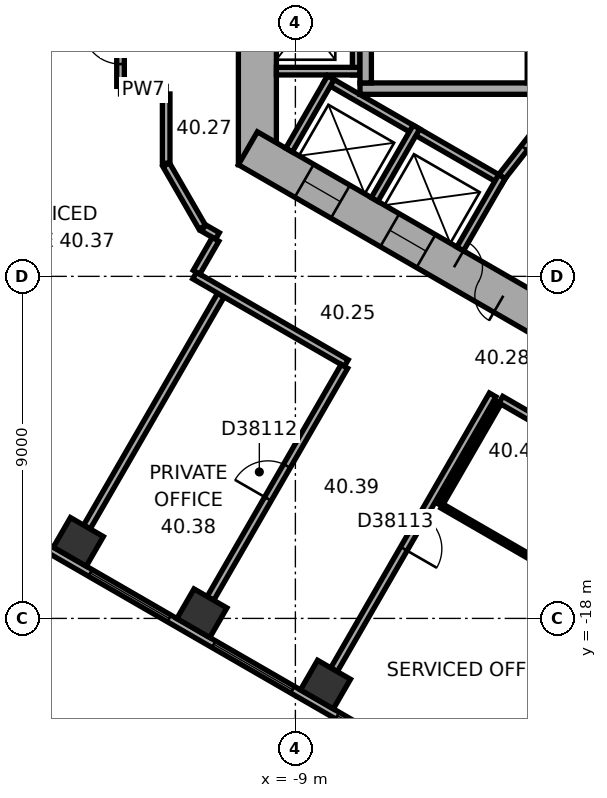
"""IFC4 building model, lengths in metres.
Left out: names, types, materials, properties, quantities, classifications, styles, units other than length and angle.
Written with IfcOpenShell. Run it as: python <this file> out.ifc"""

import sys

from ifc_helpers import new_model, si_unit, direction, frame, frame_2d, origin, origin_2d, place, context, subcontext, project, spatial, rectangle, extrude, element, fill, save


model = new_model("IFC4")
c1 = context("Model", 3, precision=1e-05, world=origin(), true_north=direction((0.0, 1.0)))
c2 = subcontext(c1, "Body", "Model", "MODEL_VIEW")
j1 = project(units=[si_unit("LENGTHUNIT", "METRE"), si_unit("PLANEANGLEUNIT", "RADIAN")], contexts=[c1])
p1 = place(None, origin())
s1 = spatial("IfcSite", under=j1, at=p1, CompositionType="ELEMENT")
p2 = place(p1, origin())
s2 = spatial("IfcBuilding", under=s1, at=p2, CompositionType="ELEMENT")
p3 = place(p2, frame((0.0, 0.0, 165.1)))
s3 = spatial("IfcBuildingStorey", under=s2, at=p3, CompositionType="ELEMENT", Elevation=165.1)
for number, where, z_axis, x_axis in (
    (1, (-14.711, -15.986, 0.0), (0.0, 0.0, 1.0), (0.866, -0.5, 0.0)),
    (2, (-11.46, -17.863, 0.0), (0.0, 0.0, 1.0), (0.866, -0.5, 0.0)),
    (3, (-8.208, -19.74, 0.0), (0.0, 0.0, 1.0), (0.866, -0.5, 0.0)),
):
    element("IfcColumn", number, at=place(p3, frame(where, z_axis=z_axis, x_axis=x_axis)), inside=s3, PredefinedType="COLUMN", context=c2, shape_type="SweptSolid", body=[
        extrude(rectangle(XDim=1.0, YDim=0.9, at=origin_2d()), origin(), (0.0, 0.0, 1.0), 3.7),
    ])
p4 = place(p3, frame((-10.0, 6.062, 0.0), z_axis=(0.0, 0.0, 1.0), x_axis=(0.0, -1.0, 0.0)))
e4 = element("IfcWall", 4, at=p4, inside=s3, PredefinedType="SHEAR", context=c2, shape_type="SweptSolid", body=[
    extrude(rectangle(XDim=12.125, YDim=1.0, at=frame_2d((6.062, 0.0))), origin(), (0.0, 0.0, 1.0), 3.7),
])
p5 = place(p4, frame((5.212, 0.0, 0.0)))
e5 = element("IfcOpeningElement", 5, at=p5, cuts=e4, PredefinedType="OPENING", context=c2, shape_type="SweptSolid", body=[
    extrude(rectangle(XDim=1.1, YDim=2.1, at=frame_2d((0.55, 1.05))), frame((0.0, 0.51, 0.0), z_axis=(0.0, -1.0, 0.0), x_axis=(1.0, 0.0, 0.0)), (0.0, 0.0, 1.0), 1.02),
])
p6 = place(p4, frame((7.812, 0.0, 0.0)))
e6 = element("IfcOpeningElement", 6, at=p6, cuts=e4, PredefinedType="OPENING", context=c2, shape_type="SweptSolid", body=[
    extrude(rectangle(XDim=1.1, YDim=2.1, at=frame_2d((0.55, 1.05))), frame((0.0, 0.51, 0.0), z_axis=(0.0, -1.0, 0.0), x_axis=(1.0, 0.0, 0.0)), (0.0, 0.0, 1.0), 1.02),
])
p7 = place(p3, frame((-10.25, -5.629, 0.0), z_axis=(0.0, 0.0, 1.0), x_axis=(0.866022616891, -0.50000482701, 0.0)))
e7 = element("IfcWall", 7, at=p7, inside=s3, PredefinedType="SHEAR", context=c2, shape_type="SweptSolid", body=[
    extrude(rectangle(XDim=12.125, YDim=1.0, at=frame_2d((6.062, 0.0))), origin(), (0.0, 0.0, 1.0), 3.7),
])
p8 = place(p7, frame((6.262, 0.0, 0.0)))
e8 = element("IfcOpeningElement", 8, at=p8, cuts=e7, PredefinedType="OPENING", context=c2, shape_type="SweptSolid", body=[
    extrude(rectangle(XDim=1.5, YDim=2.1, at=frame_2d((0.75, 1.05))), frame((0.0, 0.51, 0.0), z_axis=(0.0, -1.0, 0.0), x_axis=(1.0, 0.0, 0.0)), (0.0, 0.0, 1.0), 1.02),
])
p9 = place(p7, frame((1.712, 0.0, 0.0)))
e9 = element("IfcOpeningElement", 9, at=p9, cuts=e7, PredefinedType="OPENING", context=c2, shape_type="SweptSolid", body=[
    extrude(rectangle(XDim=1.1, YDim=2.1, at=frame_2d((0.55, 1.05))), frame((0.0, 0.51, 0.0), z_axis=(0.0, -1.0, 0.0), x_axis=(1.0, 0.0, 0.0)), (0.0, 0.0, 1.0), 1.02),
])
p10 = place(p7, frame((4.312, 0.0, 0.0)))
e10 = element("IfcOpeningElement", 10, at=p10, cuts=e7, PredefinedType="OPENING", context=c2, shape_type="SweptSolid", body=[
    extrude(rectangle(XDim=1.1, YDim=2.1, at=frame_2d((0.55, 1.05))), frame((0.0, 0.51, 0.0), z_axis=(0.0, -1.0, 0.0), x_axis=(1.0, 0.0, 0.0)), (0.0, 0.0, 1.0), 1.02),
])
p11 = place(p3, frame((-18.789, -14.267, 0.0), z_axis=(0.0, 0.0, 1.0), x_axis=(0.866023315909, -0.500003616288, 0.0)))
e11 = element("IfcWall", 11, at=p11, inside=s3, PredefinedType="STANDARD", context=c2, shape_type="SweptSolid", body=[
    extrude(rectangle(XDim=20.044, YDim=0.2, at=frame_2d((10.022, 0.0))), origin(), (0.0, 0.0, 1.0), 3.7),
])
p12 = place(p11, frame((1.314, 0.0, 0.9)))
e12 = element("IfcOpeningElement", 12, at=p12, cuts=e11, PredefinedType="OPENING", context=c2, shape_type="SweptSolid", body=[
    extrude(rectangle(XDim=2.4, YDim=2.0, at=frame_2d((1.2, 1.0))), frame((0.0, 0.11, 0.0), z_axis=(0.0, -1.0, 0.0), x_axis=(1.0, 0.0, 0.0)), (0.0, 0.0, 1.0), 0.22),
])
p13 = place(p11, frame((5.069, 0.0, 0.9)))
e13 = element("IfcOpeningElement", 13, at=p13, cuts=e11, PredefinedType="OPENING", context=c2, shape_type="SweptSolid", body=[
    extrude(rectangle(XDim=2.4, YDim=2.0, at=frame_2d((1.2, 1.0))), frame((0.0, 0.11, 0.0), z_axis=(0.0, -1.0, 0.0), x_axis=(1.0, 0.0, 0.0)), (0.0, 0.0, 1.0), 0.22),
])
p14 = place(p11, frame((8.823, 0.0, 0.9)))
e14 = element("IfcOpeningElement", 14, at=p14, cuts=e11, PredefinedType="OPENING", context=c2, shape_type="SweptSolid", body=[
    extrude(rectangle(XDim=2.4, YDim=2.0, at=frame_2d((1.2, 1.0))), frame((0.0, 0.11, 0.0), z_axis=(0.0, -1.0, 0.0), x_axis=(1.0, 0.0, 0.0)), (0.0, 0.0, 1.0), 0.22),
])
p15 = place(p11, frame((12.577, 0.0, 0.9)))
e15 = element("IfcOpeningElement", 15, at=p15, cuts=e11, PredefinedType="OPENING", context=c2, shape_type="SweptSolid", body=[
    extrude(rectangle(XDim=2.4, YDim=2.0, at=frame_2d((1.2, 1.0))), frame((0.0, 0.11, 0.0), z_axis=(0.0, -1.0, 0.0), x_axis=(1.0, 0.0, 0.0)), (0.0, 0.0, 1.0), 0.22),
])
p16 = place(p11, frame((16.331, 0.0, 0.9)))
e16 = element("IfcOpeningElement", 16, at=p16, cuts=e11, PredefinedType="OPENING", context=c2, shape_type="SweptSolid", body=[
    extrude(rectangle(XDim=2.4, YDim=2.0, at=frame_2d((1.2, 1.0))), frame((0.0, 0.11, 0.0), z_axis=(0.0, -1.0, 0.0), x_axis=(1.0, 0.0, 0.0)), (0.0, 0.0, 1.0), 0.22),
])
p17 = place(p3, frame((-7.4, 4.3, 0.0), z_axis=(0.0, 0.0, 1.0), x_axis=(0.0, -1.0, 0.0)))
e17 = element("IfcWall", 17, at=p17, inside=s3, PredefinedType="PARTITIONING", context=c2, shape_type="SweptSolid", body=[
    extrude(rectangle(XDim=8.0, YDim=0.2, at=frame_2d((4.0, 0.0))), origin(), (0.0, 0.0, 1.0), 3.42),
])
p18 = place(p3, frame((-7.3, -3.6, 0.0), z_axis=(0.0, 0.0, 1.0), x_axis=(-1.0, 0.0, 0.0)))
e18 = element("IfcWall", 18, at=p18, inside=s3, PredefinedType="PARTITIONING", context=c2, shape_type="SweptSolid", body=[
    extrude(rectangle(XDim=2.2, YDim=0.2, at=frame_2d((1.1, 0.0))), origin(), (0.0, 0.0, 1.0), 3.42),
])
p19 = place(p3, frame((-8.203, -3.809, 0.0), z_axis=(0.0, 0.0, 1.0), x_axis=(0.866028230842, -0.499995103361, 0.0)))
e19 = element("IfcWall", 19, at=p19, inside=s3, PredefinedType="PARTITIONING", context=c2, shape_type="SweptSolid", body=[
    extrude(rectangle(XDim=5.4, YDim=0.2, at=frame_2d((2.7, 0.0))), origin(), (0.0, 0.0, 1.0), 3.42),
])
for number, where, z_axis, x_axis in (
    (20, (-8.067, -3.772, 0.0), (0.0, 0.0, 1.0), (-0.5, -0.866, 0.0)),
    (21, (-5.815, -5.072, 0.0), (0.0, 0.0, 1.0), (-0.5, -0.866, 0.0)),
):
    element("IfcWall", number, at=place(p3, frame(where, z_axis=z_axis, x_axis=x_axis)), inside=s3, PredefinedType="PARTITIONING", context=c2, shape_type="SweptSolid", body=[
        extrude(rectangle(XDim=2.2, YDim=0.2, at=frame_2d((1.1, 0.0))), origin(), (0.0, 0.0, 1.0), 3.42),
    ])
p20 = place(p3, frame((-3.563, -6.372, 0.0), z_axis=(0.0, 0.0, 1.0), x_axis=(-0.499994660107, -0.866028486751, 0.0)))
e22 = element("IfcWall", 22, at=p20, inside=s3, PredefinedType="PARTITIONING", context=c2, shape_type="SweptSolid", body=[
    extrude(rectangle(XDim=2.2, YDim=0.2, at=frame_2d((1.1, 0.0))), origin(), (0.0, 0.0, 1.0), 3.42),
])
p21 = place(p3, frame((-2.6, -4.06, 0.0), z_axis=(0.0, 0.0, 1.0), x_axis=(-1.0, 0.0, 0.0)))
e23 = element("IfcWall", 23, at=p21, inside=s3, PredefinedType="SHEAR", context=c2, shape_type="SweptSolid", body=[
    extrude(rectangle(XDim=4.7, YDim=0.3, at=frame_2d((2.35, 0.0))), origin(), (0.0, 0.0, 1.0), 3.42),
])
for number, where, z_axis, x_axis in (
    (24, (-2.75, 3.15, 0.0), (0.0, 0.0, 1.0), (0.0, -1.0, 0.0)),
    (25, (-7.15, 3.15, 0.0), (0.0, 0.0, 1.0), (0.0, -1.0, 0.0)),
):
    element("IfcWall", number, at=place(p3, frame(where, z_axis=z_axis, x_axis=x_axis)), inside=s3, PredefinedType="SHEAR", context=c2, shape_type="SweptSolid", body=[
        extrude(rectangle(XDim=7.06, YDim=0.3, at=frame_2d((3.53, 0.0))), origin(), (0.0, 0.0, 1.0), 3.42),
    ])
p22 = place(p3, frame((-1.712, -4.008, 0.0), z_axis=(0.0, 0.0, 1.0), x_axis=(-0.616549420702, -0.787316208287, 0.0)))
e26 = element("IfcWall", 26, at=p22, inside=s3, PredefinedType="PARTITIONING", context=c2, shape_type="SweptSolid", body=[
    extrude(rectangle(XDim=3.002, YDim=0.2, at=frame_2d((1.501, 0.0))), origin(), (0.0, 0.0, 1.0), 3.42),
])
p23 = place(p22, frame((1.15, 0.0, 0.0)))
e27 = element("IfcOpeningElement", 27, at=p23, cuts=e26, PredefinedType="OPENING", context=c2, shape_type="SweptSolid", body=[
    extrude(rectangle(XDim=0.9, YDim=2.1, at=frame_2d((0.45, 1.05))), frame((0.0, 0.11, 0.0), z_axis=(0.0, -1.0, 0.0), x_axis=(1.0, 0.0, 0.0)), (0.0, 0.0, 1.0), 0.22),
])
p24 = place(p3, frame((-14.486, -15.597, 0.0), z_axis=(0.0, 0.0, 1.0), x_axis=(0.499983284935, 0.866035054017, 0.0)))
e28 = element("IfcWall", 28, at=p24, inside=s3, PredefinedType="PARTITIONING", context=c2, shape_type="SweptSolid", body=[
    extrude(rectangle(XDim=7.049, YDim=0.2, at=frame_2d((3.524, 0.0))), origin(), (0.0, 0.0, 1.0), 3.42),
])
p25 = place(p3, frame((-13.601, -4.101, 0.0), z_axis=(0.0, 0.0, 1.0), x_axis=(1.0, 0.0, 0.0)))
e29 = element("IfcWall", 29, at=p25, inside=s3, PredefinedType="PARTITIONING", context=c2, shape_type="SweptSolid", body=[
    extrude(rectangle(XDim=1.201, YDim=0.2, at=frame_2d((0.601, 0.0))), origin(), (0.0, 0.0, 1.0), 3.42),
])
p26 = place(p3, frame((-13.601, 2.101, 0.0), z_axis=(0.0, 0.0, 1.0), x_axis=(0.0, -1.0, 0.0)))
e30 = element("IfcWall", 30, at=p26, inside=s3, PredefinedType="PARTITIONING", context=c2, shape_type="SweptSolid", body=[
    extrude(rectangle(XDim=6.102, YDim=0.2, at=frame_2d((3.051, 0.0))), origin(), (0.0, 0.0, 1.0), 3.42),
])
p27 = place(p26, frame((1.464, 0.0, 0.0)))
e31 = element("IfcOpeningElement", 31, at=p27, cuts=e30, PredefinedType="OPENING", context=c2, shape_type="SweptSolid", body=[
    extrude(rectangle(XDim=1.0, YDim=2.1, at=frame_2d((0.5, 1.05))), frame((0.0, 0.11, 0.0), z_axis=(0.0, -1.0, 0.0), x_axis=(1.0, 0.0, 0.0)), (0.0, 0.0, 1.0), 0.22),
])
p28 = place(p26, frame((4.515, 0.0, 0.0)))
e32 = element("IfcOpeningElement", 32, at=p28, cuts=e30, PredefinedType="OPENING", context=c2, shape_type="SweptSolid", body=[
    extrude(rectangle(XDim=1.0, YDim=2.1, at=frame_2d((0.5, 1.05))), frame((0.0, 0.11, 0.0), z_axis=(0.0, -1.0, 0.0), x_axis=(1.0, 0.0, 0.0)), (0.0, 0.0, 1.0), 0.22),
])
p29 = place(p3, frame((-12.4, -6.062, 0.0), z_axis=(0.0, 0.0, 1.0), x_axis=(0.500022797313, -0.86601224135, 0.0)))
e33 = element("IfcWall", 33, at=p29, inside=s3, PredefinedType="PARTITIONING", context=c2, shape_type="SweptSolid", body=[
    extrude(rectangle(XDim=1.9, YDim=0.2, at=frame_2d((0.95, 0.0))), origin(), (0.0, 0.0, 1.0), 3.42),
])
p30 = place(p3, frame((-12.4, -4.201, 0.0), z_axis=(0.0, 0.0, 1.0), x_axis=(0.0, -1.0, 0.0)))
e34 = element("IfcWall", 34, at=p30, inside=s3, PredefinedType="PARTITIONING", context=c2, shape_type="SweptSolid", body=[
    extrude(rectangle(XDim=1.821, YDim=0.2, at=frame_2d((0.911, 0.0))), origin(), (0.0, 0.0, 1.0), 3.42),
])
p31 = place(p3, frame((-11.651, -8.978, 0.0), z_axis=(0.0, 0.0, 1.0), x_axis=(0.866010893236, -0.500025132165, 0.0)))
e35 = element("IfcWall", 35, at=p31, inside=s3, PredefinedType="PARTITIONING", context=c2, shape_type="SweptSolid", body=[
    extrude(rectangle(XDim=4.608, YDim=0.2, at=frame_2d((2.304, 0.0))), origin(), (0.0, 0.0, 1.0), 3.42),
])
p32 = place(p3, frame((-11.415, -7.728, 0.0), z_axis=(0.0, 0.0, 1.0), x_axis=(0.865915281873, -0.500190688257, 0.0)))
e36 = element("IfcWall", 36, at=p32, inside=s3, PredefinedType="PARTITIONING", context=c2, shape_type="SweptSolid", body=[
    extrude(rectangle(XDim=0.421, YDim=0.2, at=frame_2d((0.21, 0.0))), origin(), (0.0, 0.0, 1.0), 3.42),
])
p33 = place(p3, frame((-11.235, -17.474, 0.0), z_axis=(0.0, 0.0, 1.0), x_axis=(0.500009260695, 0.866020057054, 0.0)))
e37 = element("IfcWall", 37, at=p33, inside=s3, PredefinedType="PARTITIONING", context=c2, shape_type="SweptSolid", body=[
    extrude(rectangle(XDim=7.049, YDim=0.2, at=frame_2d((3.524, 0.0))), origin(), (0.0, 0.0, 1.0), 2.87),
])
p34 = place(p33, frame((3.024, 0.0, 0.0)))
e38 = element("IfcOpeningElement", 38, at=p34, cuts=e37, PredefinedType="OPENING", context=c2, shape_type="SweptSolid", body=[
    extrude(rectangle(XDim=1.0, YDim=2.1, at=frame_2d((0.5, 1.05))), frame((0.0, 0.11, 0.0), z_axis=(0.0, -1.0, 0.0), x_axis=(1.0, 0.0, 0.0)), (0.0, 0.0, 1.0), 0.22),
])
p35 = place(p3, frame((-11.101, -8.025, 0.0), z_axis=(0.0, 0.0, 1.0), x_axis=(-0.500074377092, -0.865982457891, 0.0)))
e39 = element("IfcWall", 39, at=p35, inside=s3, PredefinedType="PARTITIONING", context=c2, shape_type="SweptSolid", body=[
    extrude(rectangle(XDim=1.001, YDim=0.2, at=frame_2d((0.5, 0.0))), origin(), (0.0, 0.0, 1.0), 3.42),
])
p36 = place(p3, frame((-7.984, -19.351, 0.0), z_axis=(0.0, 0.0, 1.0), x_axis=(0.500010139422, 0.866019549707, 0.0)))
e40 = element("IfcWall", 40, at=p36, inside=s3, PredefinedType="PARTITIONING", context=c2, shape_type="SweptSolid", body=[
    extrude(rectangle(XDim=8.35, YDim=0.2, at=frame_2d((4.175, 0.0))), origin(), (0.0, 0.0, 1.0), 3.42),
])
p37 = place(p36, frame((3.675, 0.0, 0.0)))
e41 = element("IfcOpeningElement", 41, at=p37, cuts=e40, PredefinedType="OPENING", context=c2, shape_type="SweptSolid", body=[
    extrude(rectangle(XDim=1.0, YDim=2.1, at=frame_2d((0.5, 1.05))), frame((0.0, 0.11, 0.0), z_axis=(0.0, -1.0, 0.0), x_axis=(1.0, 0.0, 0.0)), (0.0, 0.0, 1.0), 0.22),
])
p38 = place(p3, frame((-5.192, -15.016, 0.0), z_axis=(0.0, 0.0, 1.0), x_axis=(0.500026960575, 0.86600983753, 0.0)))
e42 = element("IfcWall", 42, at=p38, inside=s3, PredefinedType="PARTITIONING", context=c2, shape_type="SweptSolid", body=[
    extrude(rectangle(XDim=3.1, YDim=0.12, at=frame_2d((1.55, 0.0))), origin(), (0.0, 0.0, 1.0), 3.42),
])
p39 = place(p3, frame((-3.592, -12.244, 0.0), z_axis=(0.0, 0.0, 1.0), x_axis=(0.866034573852, -0.49998411664, 0.0)))
e43 = element("IfcWall", 43, at=p39, inside=s3, PredefinedType="PARTITIONING", context=c2, shape_type="SweptSolid", body=[
    extrude(rectangle(XDim=2.8, YDim=0.2, at=frame_2d((1.4, 0.0))), origin(), (0.0, 0.0, 1.0), 3.42),
])
p40 = place(p3, frame((-2.767, -16.416, 0.0), z_axis=(0.0, 0.0, 1.0), x_axis=(-0.865997131366, 0.500048966069, 0.0)))
e44 = element("IfcWall", 44, at=p40, inside=s3, PredefinedType="PARTITIONING", context=c2, shape_type="SweptSolid", body=[
    extrude(rectangle(XDim=2.74, YDim=0.12, at=frame_2d((1.37, 0.0))), origin(), (0.0, 0.0, 1.0), 3.42),
])
p41 = place(p13, origin())
e45 = element("IfcWindow", 45, at=p41, inside=s3, PartitioningType="SINGLE_PANEL", PredefinedType="WINDOW", context=c2, shape_type="SweptSolid", body=[
    extrude(rectangle(XDim=2.4, YDim=2.0, at=frame_2d((1.2, 1.0))), frame((0.0, 0.03, 0.0), z_axis=(0.0, -1.0, 0.0), x_axis=(1.0, 0.0, 0.0)), (0.0, 0.0, 1.0), 0.06),
])
fill(e13, e45)
p42 = place(p14, origin())
e46 = element("IfcWindow", 46, at=p42, inside=s3, PartitioningType="SINGLE_PANEL", PredefinedType="WINDOW", context=c2, shape_type="SweptSolid", body=[
    extrude(rectangle(XDim=2.4, YDim=2.0, at=frame_2d((1.2, 1.0))), frame((0.0, 0.03, 0.0), z_axis=(0.0, -1.0, 0.0), x_axis=(1.0, 0.0, 0.0)), (0.0, 0.0, 1.0), 0.06),
])
fill(e14, e46)
p43 = place(p15, origin())
e47 = element("IfcWindow", 47, at=p43, inside=s3, PartitioningType="SINGLE_PANEL", PredefinedType="WINDOW", context=c2, shape_type="SweptSolid", body=[
    extrude(rectangle(XDim=2.4, YDim=2.0, at=frame_2d((1.2, 1.0))), frame((0.0, 0.03, 0.0), z_axis=(0.0, -1.0, 0.0), x_axis=(1.0, 0.0, 0.0)), (0.0, 0.0, 1.0), 0.06),
])
fill(e15, e47)
p44 = place(p8, origin())
e48 = element("IfcDoor", 48, at=p44, inside=s3, OperationType="DOUBLE_DOOR_SINGLE_SWING", PredefinedType="DOOR", context=c2, shape_type="SweptSolid", body=[
    extrude(rectangle(XDim=1.5, YDim=2.1, at=frame_2d((0.75, 1.05))), frame((0.0, 0.025, 0.0), z_axis=(0.0, -1.0, 0.0), x_axis=(1.0, 0.0, 0.0)), (0.0, 0.0, 1.0), 0.05),
])
fill(e8, e48)
p45 = place(p23, origin())
e49 = element("IfcDoor", 49, at=p45, inside=s3, OperationType="SINGLE_SWING_LEFT", PredefinedType="DOOR", context=c2, shape_type="SweptSolid", body=[
    extrude(rectangle(XDim=0.9, YDim=2.1, at=frame_2d((0.45, 1.05))), frame((0.0, 0.025, 0.0), z_axis=(0.0, -1.0, 0.0), x_axis=(1.0, 0.0, 0.0)), (0.0, 0.0, 1.0), 0.05),
])
fill(e27, e49)
p46 = place(p9, origin())
e50 = element("IfcDoor", 50, at=p46, inside=s3, OperationType="DOUBLE_DOOR_SLIDING", PredefinedType="DOOR", context=c2, shape_type="SweptSolid", body=[
    extrude(rectangle(XDim=1.1, YDim=2.1, at=frame_2d((0.55, 1.05))), frame((0.0, 0.025, 0.0), z_axis=(0.0, -1.0, 0.0), x_axis=(1.0, 0.0, 0.0)), (0.0, 0.0, 1.0), 0.05),
])
fill(e9, e50)
p47 = place(p10, origin())
e51 = element("IfcDoor", 51, at=p47, inside=s3, OperationType="DOUBLE_DOOR_SLIDING", PredefinedType="DOOR", context=c2, shape_type="SweptSolid", body=[
    extrude(rectangle(XDim=1.1, YDim=2.1, at=frame_2d((0.55, 1.05))), frame((0.0, 0.025, 0.0), z_axis=(0.0, -1.0, 0.0), x_axis=(1.0, 0.0, 0.0)), (0.0, 0.0, 1.0), 0.05),
])
fill(e10, e51)
p48 = place(p28, origin())
e52 = element("IfcDoor", 52, at=p48, inside=s3, OperationType="SINGLE_SWING_LEFT", PredefinedType="DOOR", context=c2, shape_type="SweptSolid", body=[
    extrude(rectangle(XDim=1.0, YDim=2.1, at=frame_2d((0.5, 1.05))), frame((0.0, 0.025, 0.0), z_axis=(0.0, -1.0, 0.0), x_axis=(1.0, 0.0, 0.0)), (0.0, 0.0, 1.0), 0.05),
])
fill(e32, e52)
p49 = place(p34, origin())
e53 = element("IfcDoor", 53, at=p49, inside=s3, OperationType="SINGLE_SWING_LEFT", PredefinedType="DOOR", context=c2, shape_type="SweptSolid", body=[
    extrude(rectangle(XDim=1.0, YDim=2.1, at=frame_2d((0.5, 1.05))), frame((0.0, 0.025, 0.0), z_axis=(0.0, -1.0, 0.0), x_axis=(1.0, 0.0, 0.0)), (0.0, 0.0, 1.0), 0.05),
])
fill(e38, e53)
p50 = place(p37, origin())
e54 = element("IfcDoor", 54, at=p50, inside=s3, OperationType="SINGLE_SWING_LEFT", PredefinedType="DOOR", context=c2, shape_type="SweptSolid", body=[
    extrude(rectangle(XDim=1.0, YDim=2.1, at=frame_2d((0.5, 1.05))), frame((0.0, 0.025, 0.0), z_axis=(0.0, -1.0, 0.0), x_axis=(1.0, 0.0, 0.0)), (0.0, 0.0, 1.0), 0.05),
])
fill(e41, e54)
save(model, sys.argv[1])
